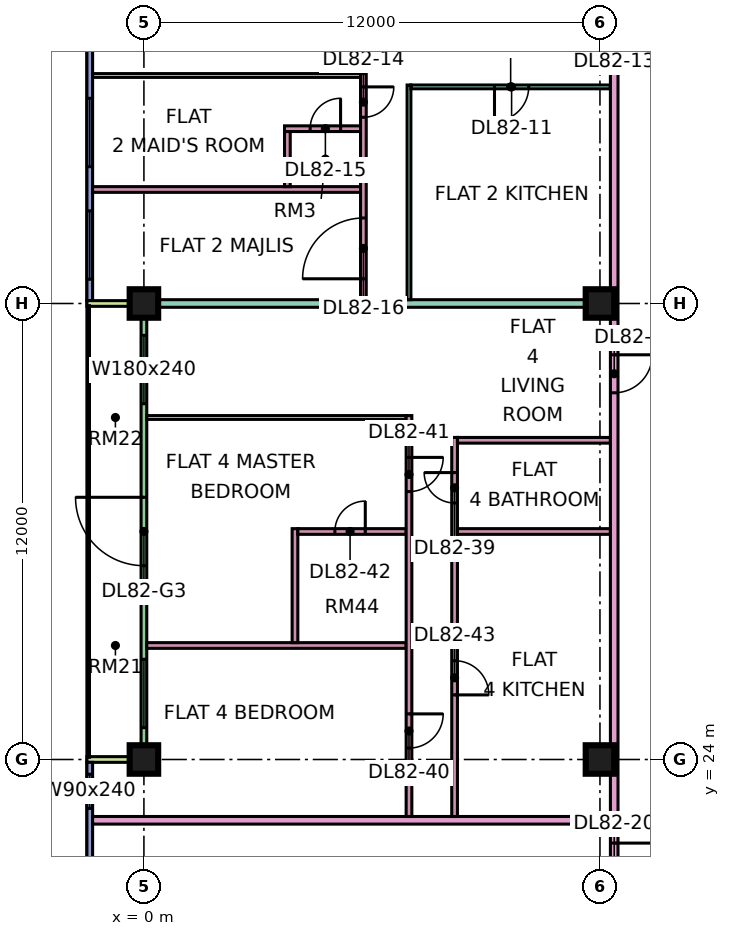
"""IFC4 building model, lengths in metres.
Left out: names, types, materials, properties, quantities, classifications, styles, units other than length and angle.
Written with IfcOpenShell. Run it as: python <this file> out.ifc"""

import sys

from ifc_helpers import new_model, si_unit, direction, frame, frame_2d, origin, origin_2d, place, context, subcontext, project, spatial, rectangle, extrude, element, fill, save


model = new_model("IFC4")
c1 = context("Model", 3, precision=1e-05, world=origin(), true_north=direction((0.0, 1.0)))
c2 = subcontext(c1, "Body", "Model", "MODEL_VIEW")
j1 = project(units=[si_unit("LENGTHUNIT", "METRE"), si_unit("PLANEANGLEUNIT", "RADIAN")], contexts=[c1])
p1 = place(None, origin())
s1 = spatial("IfcSite", under=j1, at=p1, CompositionType="ELEMENT")
p2 = place(p1, origin())
s2 = spatial("IfcBuilding", under=s1, at=p2, CompositionType="ELEMENT")
p3 = place(p2, frame((0.0, 0.0, 353.9)))
s3 = spatial("IfcBuildingStorey", under=s2, at=p3, CompositionType="ELEMENT", Elevation=353.9)
p4 = place(p3, frame((0.0, 24.0, 0.0), z_axis=(0.0, 0.0, 1.0), x_axis=(1.0, 0.0, 0.0)))
e1 = element("IfcColumn", 1, at=p4, inside=s3, PredefinedType="COLUMN", context=c2, shape_type="SweptSolid", body=[
    extrude(rectangle(XDim=0.75, YDim=0.75, at=origin_2d()), origin(), (0.0, 0.0, 1.0), 3.75),
])
p5 = place(p3, frame((0.0, 36.0, 0.0), z_axis=(0.0, 0.0, 1.0), x_axis=(1.0, 0.0, 0.0)))
e2 = element("IfcColumn", 2, at=p5, inside=s3, PredefinedType="COLUMN", context=c2, shape_type="SweptSolid", body=[
    extrude(rectangle(XDim=0.75, YDim=0.75, at=origin_2d()), origin(), (0.0, 0.0, 1.0), 3.75),
])
for number, where, z_axis, x_axis in (
    (3, (12.0, 24.0, 0.0), (0.0, 0.0, 1.0), (1.0, 0.0, 0.0)),
    (4, (12.0, 36.0, 0.0), (0.0, 0.0, 1.0), (1.0, 0.0, 0.0)),
):
    element("IfcColumn", number, at=place(p3, frame(where, z_axis=z_axis, x_axis=x_axis)), inside=s3, PredefinedType="COLUMN", context=c2, shape_type="SweptSolid", body=[
        extrude(rectangle(XDim=0.75, YDim=0.75, at=origin_2d()), origin(), (0.0, 0.0, 1.0), 3.75),
    ])
p6 = place(p3, frame((-1.425, 47.925, 0.0), z_axis=(0.0, 0.0, 1.0), x_axis=(0.0, -1.0, 0.0)))
e5 = element("IfcWall", 5, at=p6, inside=s3, PredefinedType="SOLIDWALL", context=c2, shape_type="SweptSolid", body=[
    extrude(rectangle(XDim=11.85, YDim=0.15, at=frame_2d((5.925, 0.0))), origin(), (0.0, 0.0, 1.0), 3.35),
])
p7 = place(p6, frame((1.462, 0.0, 0.45)))
e6 = element("IfcOpeningElement", 6, at=p7, cuts=e5, PredefinedType="OPENING", context=c2, shape_type="SweptSolid", body=[
    extrude(rectangle(XDim=3.0, YDim=2.4, at=frame_2d((1.5, 1.2))), frame((0.0, 0.085, 0.0), z_axis=(0.0, -1.0, 0.0), x_axis=(1.0, 0.0, 0.0)), (0.0, 0.0, 1.0), 0.17),
])
p8 = place(p6, frame((6.525, 0.0, 0.45)))
e7 = element("IfcOpeningElement", 7, at=p8, cuts=e5, PredefinedType="OPENING", context=c2, shape_type="SweptSolid", body=[
    extrude(rectangle(XDim=1.8, YDim=2.4, at=frame_2d((0.9, 1.2))), frame((0.0, 0.085, 0.0), z_axis=(0.0, -1.0, 0.0), x_axis=(1.0, 0.0, 0.0)), (0.0, 0.0, 1.0), 0.17),
])
p9 = place(p6, frame((9.488, 0.0, 0.45)))
e8 = element("IfcOpeningElement", 8, at=p9, cuts=e5, PredefinedType="OPENING", context=c2, shape_type="SweptSolid", body=[
    extrude(rectangle(XDim=1.8, YDim=2.4, at=frame_2d((0.9, 1.2))), frame((0.0, 0.085, 0.0), z_axis=(0.0, -1.0, 0.0), x_axis=(1.0, 0.0, 0.0)), (0.0, 0.0, 1.0), 0.17),
])
p10 = place(p3, frame((0.0, 35.925, 0.0), z_axis=(0.0, 0.0, 1.0), x_axis=(0.0, -1.0, 0.0)))
e9 = element("IfcWall", 9, at=p10, inside=s3, PredefinedType="SOLIDWALL", context=c2, shape_type="SweptSolid", body=[
    extrude(rectangle(XDim=11.85, YDim=0.15, at=frame_2d((5.925, 0.0))), origin(), (0.0, 0.0, 1.0), 3.35),
])
p11 = place(p10, frame((0.762, 0.0, 0.45)))
e10 = element("IfcOpeningElement", 10, at=p11, cuts=e9, PredefinedType="OPENING", context=c2, shape_type="SweptSolid", body=[
    extrude(rectangle(XDim=1.8, YDim=2.4, at=frame_2d((0.9, 1.2))), frame((0.0, 0.085, 0.0), z_axis=(0.0, -1.0, 0.0), x_axis=(1.0, 0.0, 0.0)), (0.0, 0.0, 1.0), 0.17),
])
p12 = place(p10, frame((5.025, 0.0, 0.0)))
e11 = element("IfcOpeningElement", 11, at=p12, cuts=e9, PredefinedType="OPENING", context=c2, shape_type="SweptSolid", body=[
    extrude(rectangle(XDim=1.8, YDim=2.4, at=frame_2d((0.9, 1.2))), frame((0.0, 0.085, 0.0), z_axis=(0.0, -1.0, 0.0), x_axis=(1.0, 0.0, 0.0)), (0.0, 0.0, 1.0), 0.17),
])
p13 = place(p10, frame((9.288, 0.0, 0.45)))
e12 = element("IfcOpeningElement", 12, at=p13, cuts=e9, PredefinedType="OPENING", context=c2, shape_type="SweptSolid", body=[
    extrude(rectangle(XDim=1.8, YDim=2.4, at=frame_2d((0.9, 1.2))), frame((0.0, 0.085, 0.0), z_axis=(0.0, -1.0, 0.0), x_axis=(1.0, 0.0, 0.0)), (0.0, 0.0, 1.0), 0.17),
])
for number, where, z_axis, x_axis in (
    (13, (-1.5, 36.0, 0.0), (0.0, 0.0, 1.0), (1.0, 0.0, 0.0)),
    (14, (-1.5, 24.0, 0.0), (0.0, 0.0, 1.0), (1.0, 0.0, 0.0)),
):
    element("IfcWall", number, at=place(p3, frame(where, z_axis=z_axis, x_axis=x_axis)), inside=s3, PredefinedType="SOLIDWALL", context=c2, shape_type="SweptSolid", body=[
        extrude(rectangle(XDim=1.5, YDim=0.15, at=frame_2d((0.75, 0.0))), origin(), (0.0, 0.0, 1.0), 3.35),
    ])
p14 = place(p3, frame((-1.425, 23.925, 0.0), z_axis=(0.0, 0.0, 1.0), x_axis=(0.0, -1.0, 0.0)))
e15 = element("IfcWall", 15, at=p14, inside=s3, PredefinedType="SOLIDWALL", context=c2, shape_type="SweptSolid", body=[
    extrude(rectangle(XDim=11.425, YDim=0.15, at=frame_2d((5.712, 0.0))), origin(), (0.0, 0.0, 1.0), 3.35),
])
p15 = place(p14, frame((0.312, 0.0, 0.45)))
e16 = element("IfcOpeningElement", 16, at=p15, cuts=e15, PredefinedType="OPENING", context=c2, shape_type="SweptSolid", body=[
    extrude(rectangle(XDim=0.9, YDim=2.4, at=frame_2d((0.45, 1.2))), frame((0.0, 0.085, 0.0), z_axis=(0.0, -1.0, 0.0), x_axis=(1.0, 0.0, 0.0)), (0.0, 0.0, 1.0), 0.17),
])
p16 = place(p14, frame((6.175, 0.0, 0.45)))
e17 = element("IfcOpeningElement", 17, at=p16, cuts=e15, PredefinedType="OPENING", context=c2, shape_type="SweptSolid", body=[
    extrude(rectangle(XDim=3.0, YDim=2.4, at=frame_2d((1.5, 1.2))), frame((0.0, 0.085, 0.0), z_axis=(0.0, -1.0, 0.0), x_axis=(1.0, 0.0, 0.0)), (0.0, 0.0, 1.0), 0.17),
])
p17 = place(p3, frame((-1.351, 39.0, 0.0), z_axis=(0.0, 0.0, 1.0), x_axis=(1.0, 0.0, 0.0)))
e18 = element("IfcWall", 18, at=p17, inside=s3, PredefinedType="PARTITIONING", context=c2, shape_type="SweptSolid", body=[
    extrude(rectangle(XDim=7.051, YDim=0.15, at=frame_2d((3.525, 0.0))), origin(), (0.0, 0.0, 1.0), 3.35),
])
p18 = place(p3, frame((-1.35, 22.4, 0.0), z_axis=(0.0, 0.0, 1.0), x_axis=(1.0, 0.0, 0.0)))
e19 = element("IfcWall", 19, at=p18, inside=s3, PredefinedType="PARTITIONING", context=c2, shape_type="SweptSolid", body=[
    extrude(rectangle(XDim=13.625, YDim=0.2, at=frame_2d((6.812, 0.0))), origin(), (0.0, 0.0, 1.0), 3.35),
])
e20 = element("IfcWall", 20, at=p5, inside=s3, PredefinedType="PARTITIONING", context=c2, shape_type="SweptSolid", body=[
    extrude(rectangle(XDim=12.275, YDim=0.2, at=frame_2d((6.137, 0.0))), origin(), (0.0, 0.0, 1.0), 3.35),
])
p19 = place(p3, frame((-1.35, 42.0, 0.0), z_axis=(0.0, 0.0, 1.0), x_axis=(1.0, 0.0, 0.0)))
e21 = element("IfcWall", 21, at=p19, inside=s3, PredefinedType="PARTITIONING", context=c2, shape_type="SweptSolid", body=[
    extrude(rectangle(XDim=7.05, YDim=0.1, at=frame_2d((3.525, 0.0))), origin(), (0.0, 0.0, 1.0), 3.35),
])
p20 = place(p3, frame((0.074, 27.0, 0.0), z_axis=(0.0, 0.0, 1.0), x_axis=(1.0, 0.0, 0.0)))
e22 = element("IfcWall", 22, at=p20, inside=s3, PredefinedType="PARTITIONING", context=c2, shape_type="SweptSolid", body=[
    extrude(rectangle(XDim=6.826, YDim=0.15, at=frame_2d((3.413, 0.0))), origin(), (0.0, 0.0, 1.0), 3.35),
])
p21 = place(p3, frame((0.074, 33.0, 0.0), z_axis=(0.0, 0.0, 1.0), x_axis=(1.0, 0.0, 0.0)))
e23 = element("IfcWall", 23, at=p21, inside=s3, PredefinedType="PARTITIONING", context=c2, shape_type="SweptSolid", body=[
    extrude(rectangle(XDim=6.826, YDim=0.1, at=frame_2d((3.413, 0.0))), origin(), (0.0, 0.0, 1.0), 3.35),
])
p22 = place(p3, frame((3.7, 40.6, 0.0), z_axis=(0.0, 0.0, 1.0), x_axis=(1.0, 0.0, 0.0)))
e24 = element("IfcWall", 24, at=p22, inside=s3, PredefinedType="PARTITIONING", context=c2, shape_type="SweptSolid", body=[
    extrude(rectangle(XDim=2.0, YDim=0.15, at=frame_2d((1.0, 0.0))), origin(), (0.0, 0.0, 1.0), 3.35),
])
p23 = place(p22, frame((0.675, 0.0, 0.0)))
e25 = element("IfcOpeningElement", 25, at=p23, cuts=e24, PredefinedType="OPENING", context=c2, shape_type="SweptSolid", body=[
    extrude(rectangle(XDim=0.8, YDim=2.1, at=frame_2d((0.4, 1.05))), frame((0.0, 0.085, 0.0), z_axis=(0.0, -1.0, 0.0), x_axis=(1.0, 0.0, 0.0)), (0.0, 0.0, 1.0), 0.17),
])
p24 = place(p3, frame((3.775, 39.075, 0.0), z_axis=(0.0, 0.0, 1.0), x_axis=(0.0, 1.0, 0.0)))
e26 = element("IfcWall", 26, at=p24, inside=s3, PredefinedType="PARTITIONING", context=c2, shape_type="SweptSolid", body=[
    extrude(rectangle(XDim=1.45, YDim=0.15, at=frame_2d((0.725, 0.0))), origin(), (0.0, 0.0, 1.0), 3.35),
])
p25 = place(p3, frame((3.975, 27.075, 0.0), z_axis=(0.0, 0.0, 1.0), x_axis=(0.0, 1.0, 0.0)))
e27 = element("IfcWall", 27, at=p25, inside=s3, PredefinedType="PARTITIONING", context=c2, shape_type="SweptSolid", body=[
    extrude(rectangle(XDim=3.0, YDim=0.15, at=frame_2d((1.5, 0.0))), origin(), (0.0, 0.0, 1.0), 3.35),
])
p26 = place(p3, frame((4.05, 30.0, 0.0), z_axis=(0.0, 0.0, 1.0), x_axis=(1.0, 0.0, 0.0)))
e28 = element("IfcWall", 28, at=p26, inside=s3, PredefinedType="PARTITIONING", context=c2, shape_type="SweptSolid", body=[
    extrude(rectangle(XDim=2.85, YDim=0.15, at=frame_2d((1.425, 0.0))), origin(), (0.0, 0.0, 1.0), 3.35),
])
p27 = place(p26, frame((0.975, 0.0, 0.0)))
e29 = element("IfcOpeningElement", 29, at=p27, cuts=e28, PredefinedType="OPENING", context=c2, shape_type="SweptSolid", body=[
    extrude(rectangle(XDim=0.8, YDim=2.1, at=frame_2d((0.4, 1.05))), frame((0.0, 0.085, 0.0), z_axis=(0.0, -1.0, 0.0), x_axis=(1.0, 0.0, 0.0)), (0.0, 0.0, 1.0), 0.17),
])
p28 = place(p3, frame((5.775, 36.1, 0.0), z_axis=(0.0, 0.0, 1.0), x_axis=(0.0, 1.0, 0.0)))
e30 = element("IfcWall", 30, at=p28, inside=s3, PredefinedType="PARTITIONING", context=c2, shape_type="SweptSolid", body=[
    extrude(rectangle(XDim=5.95, YDim=0.15, at=frame_2d((2.975, 0.0))), origin(), (0.0, 0.0, 1.0), 3.35),
])
p29 = place(p28, frame((4.8, 0.0, 0.0)))
e31 = element("IfcOpeningElement", 31, at=p29, cuts=e30, PredefinedType="OPENING", context=c2, shape_type="SweptSolid", body=[
    extrude(rectangle(XDim=0.8, YDim=2.1, at=frame_2d((0.4, 1.05))), frame((0.0, 0.085, 0.0), z_axis=(0.0, -1.0, 0.0), x_axis=(1.0, 0.0, 0.0)), (0.0, 0.0, 1.0), 0.17),
])
p30 = place(p28, frame((0.55, 0.0, 0.0)))
e32 = element("IfcOpeningElement", 32, at=p30, cuts=e30, PredefinedType="OPENING", context=c2, shape_type="SweptSolid", body=[
    extrude(rectangle(XDim=1.6, YDim=2.1, at=frame_2d((0.8, 1.05))), frame((0.0, 0.085, 0.0), z_axis=(0.0, -1.0, 0.0), x_axis=(1.0, 0.0, 0.0)), (0.0, 0.0, 1.0), 0.17),
])
p31 = place(p3, frame((6.975, 22.5, 0.0), z_axis=(0.0, 0.0, 1.0), x_axis=(0.0, 1.0, 0.0)))
e33 = element("IfcWall", 33, at=p31, inside=s3, PredefinedType="PARTITIONING", context=c2, shape_type="SweptSolid", body=[
    extrude(rectangle(XDim=10.55, YDim=0.15, at=frame_2d((5.275, 0.0))), origin(), (0.0, 0.0, 1.0), 3.35),
])
p32 = place(p31, frame((1.8, 0.0, 0.0)))
e34 = element("IfcOpeningElement", 34, at=p32, cuts=e33, PredefinedType="OPENING", context=c2, shape_type="SweptSolid", body=[
    extrude(rectangle(XDim=0.9, YDim=2.1, at=frame_2d((0.45, 1.05))), frame((0.0, 0.085, 0.0), z_axis=(0.0, -1.0, 0.0), x_axis=(1.0, 0.0, 0.0)), (0.0, 0.0, 1.0), 0.17),
])
p33 = place(p31, frame((8.55, 0.0, 0.0)))
e35 = element("IfcOpeningElement", 35, at=p33, cuts=e33, PredefinedType="OPENING", context=c2, shape_type="SweptSolid", body=[
    extrude(rectangle(XDim=0.9, YDim=2.1, at=frame_2d((0.45, 1.05))), frame((0.0, 0.085, 0.0), z_axis=(0.0, -1.0, 0.0), x_axis=(1.0, 0.0, 0.0)), (0.0, 0.0, 1.0), 0.17),
])
p34 = place(p3, frame((6.975, 36.1, 0.0), z_axis=(0.0, 0.0, 1.0), x_axis=(0.0, 1.0, 0.0)))
e36 = element("IfcWall", 36, at=p34, inside=s3, PredefinedType="PARTITIONING", context=c2, shape_type="SweptSolid", body=[
    extrude(rectangle(XDim=5.65, YDim=0.1, at=frame_2d((2.825, 0.0))), origin(), (0.0, 0.0, 1.0), 3.35),
])
p35 = place(p3, frame((7.025, 41.7, 0.0), z_axis=(0.0, 0.0, 1.0), x_axis=(1.0, 0.0, 0.0)))
e37 = element("IfcWall", 37, at=p35, inside=s3, PredefinedType="PARTITIONING", context=c2, shape_type="SweptSolid", body=[
    extrude(rectangle(XDim=5.25, YDim=0.1, at=frame_2d((2.625, 0.0))), origin(), (0.0, 0.0, 1.0), 3.35),
])
p36 = place(p35, frame((2.2, 0.0, 0.0)))
e38 = element("IfcOpeningElement", 38, at=p36, cuts=e37, PredefinedType="OPENING", context=c2, shape_type="SweptSolid", body=[
    extrude(rectangle(XDim=0.9, YDim=2.1, at=frame_2d((0.45, 1.05))), frame((0.0, 0.06, 0.0), z_axis=(0.0, -1.0, 0.0), x_axis=(1.0, 0.0, 0.0)), (0.0, 0.0, 1.0), 0.12),
])
p37 = place(p3, frame((8.175, 22.5, 0.0), z_axis=(0.0, 0.0, 1.0), x_axis=(0.0, 1.0, 0.0)))
e39 = element("IfcWall", 39, at=p37, inside=s3, PredefinedType="PARTITIONING", context=c2, shape_type="SweptSolid", body=[
    extrude(rectangle(XDim=9.975, YDim=0.15, at=frame_2d((4.988, 0.0))), origin(), (0.0, 0.0, 1.0), 3.35),
])
p38 = place(p37, frame((8.25, 0.0, 0.0)))
e40 = element("IfcOpeningElement", 40, at=p38, cuts=e39, PredefinedType="OPENING", context=c2, shape_type="SweptSolid", body=[
    extrude(rectangle(XDim=0.8, YDim=2.1, at=frame_2d((0.4, 1.05))), frame((0.0, 0.085, 0.0), z_axis=(0.0, -1.0, 0.0), x_axis=(1.0, 0.0, 0.0)), (0.0, 0.0, 1.0), 0.17),
])
p39 = place(p37, frame((3.2, 0.0, 0.0)))
e41 = element("IfcOpeningElement", 41, at=p39, cuts=e39, PredefinedType="OPENING", context=c2, shape_type="SweptSolid", body=[
    extrude(rectangle(XDim=0.9, YDim=2.1, at=frame_2d((0.45, 1.05))), frame((0.0, 0.085, 0.0), z_axis=(0.0, -1.0, 0.0), x_axis=(1.0, 0.0, 0.0)), (0.0, 0.0, 1.0), 0.17),
])
for number, where, z_axis, x_axis in (
    (42, (8.25, 30.0, 0.0), (0.0, 0.0, 1.0), (1.0, 0.0, 0.0)),
    (43, (8.25, 32.4, 0.0), (0.0, 0.0, 1.0), (1.0, 0.0, 0.0)),
):
    element("IfcWall", number, at=place(p3, frame(where, z_axis=z_axis, x_axis=x_axis)), inside=s3, PredefinedType="PARTITIONING", context=c2, shape_type="SweptSolid", body=[
        extrude(rectangle(XDim=4.025, YDim=0.15, at=frame_2d((2.012, 0.0))), origin(), (0.0, 0.0, 1.0), 3.35),
    ])
p40 = place(p3, frame((12.375, 20.0, 0.0), z_axis=(0.0, 0.0, 1.0), x_axis=(0.0, 1.0, 0.0)))
e44 = element("IfcWall", 44, at=p40, inside=s3, PredefinedType="PARTITIONING", context=c2, shape_type="SweptSolid", body=[
    extrude(rectangle(XDim=34.0, YDim=0.2, at=frame_2d((17.0, 0.0))), origin(), (0.0, 0.0, 1.0), 3.35),
])
p41 = place(p40, frame((22.95, 0.0, 0.0)))
e45 = element("IfcOpeningElement", 45, at=p41, cuts=e44, PredefinedType="OPENING", context=c2, shape_type="SweptSolid", body=[
    extrude(rectangle(XDim=1.0, YDim=2.1, at=frame_2d((0.5, 1.05))), frame((0.0, 0.11, 0.0), z_axis=(0.0, -1.0, 0.0), x_axis=(1.0, 0.0, 0.0)), (0.0, 0.0, 1.0), 0.22),
])
p42 = place(p40, frame((0.6, 0.0, 0.0)))
e46 = element("IfcOpeningElement", 46, at=p42, cuts=e44, PredefinedType="OPENING", context=c2, shape_type="SweptSolid", body=[
    extrude(rectangle(XDim=1.2, YDim=2.1, at=frame_2d((0.6, 1.05))), frame((0.0, 0.11, 0.0), z_axis=(0.0, -1.0, 0.0), x_axis=(1.0, 0.0, 0.0)), (0.0, 0.0, 1.0), 0.22),
])
p43 = place(p40, frame((13.65, 0.0, 0.0)))
e47 = element("IfcOpeningElement", 47, at=p43, cuts=e44, PredefinedType="OPENING", context=c2, shape_type="SweptSolid", body=[
    extrude(rectangle(XDim=1.0, YDim=2.1, at=frame_2d((0.5, 1.05))), frame((0.0, 0.11, 0.0), z_axis=(0.0, -1.0, 0.0), x_axis=(1.0, 0.0, 0.0)), (0.0, 0.0, 1.0), 0.22),
])
p44 = place(p8, origin())
e48 = element("IfcWindow", 48, at=p44, inside=s3, PartitioningType="SINGLE_PANEL", PredefinedType="WINDOW", context=c2, shape_type="SweptSolid", body=[
    extrude(rectangle(XDim=1.8, YDim=2.4, at=frame_2d((0.9, 1.2))), frame((0.0, 0.03, 0.0), z_axis=(0.0, -1.0, 0.0), x_axis=(1.0, 0.0, 0.0)), (0.0, 0.0, 1.0), 0.06),
])
fill(e7, e48)
p45 = place(p9, origin())
e49 = element("IfcWindow", 49, at=p45, inside=s3, PartitioningType="SINGLE_PANEL", PredefinedType="WINDOW", context=c2, shape_type="SweptSolid", body=[
    extrude(rectangle(XDim=1.8, YDim=2.4, at=frame_2d((0.9, 1.2))), frame((0.0, 0.03, 0.0), z_axis=(0.0, -1.0, 0.0), x_axis=(1.0, 0.0, 0.0)), (0.0, 0.0, 1.0), 0.06),
])
fill(e8, e49)
p46 = place(p11, origin())
e50 = element("IfcWindow", 50, at=p46, inside=s3, PartitioningType="SINGLE_PANEL", PredefinedType="WINDOW", context=c2, shape_type="SweptSolid", body=[
    extrude(rectangle(XDim=1.8, YDim=2.4, at=frame_2d((0.9, 1.2))), frame((0.0, 0.03, 0.0), z_axis=(0.0, -1.0, 0.0), x_axis=(1.0, 0.0, 0.0)), (0.0, 0.0, 1.0), 0.06),
])
fill(e10, e50)
p47 = place(p12, frame((1.8, 0.0, 0.0), z_axis=(0.0, 0.0, 1.0), x_axis=(-1.0, 0.0, 0.0)))
e51 = element("IfcDoor", 51, at=p47, inside=s3, OperationType="DOUBLE_DOOR_SINGLE_SWING", PredefinedType="DOOR", context=c2, shape_type="SweptSolid", body=[
    extrude(rectangle(XDim=1.8, YDim=2.4, at=frame_2d((0.9, 1.2))), frame((0.0, 0.025, 0.0), z_axis=(0.0, -1.0, 0.0), x_axis=(1.0, 0.0, 0.0)), (0.0, 0.0, 1.0), 0.05),
])
fill(e11, e51)
p48 = place(p13, origin())
e52 = element("IfcWindow", 52, at=p48, inside=s3, PartitioningType="SINGLE_PANEL", PredefinedType="WINDOW", context=c2, shape_type="SweptSolid", body=[
    extrude(rectangle(XDim=1.8, YDim=2.4, at=frame_2d((0.9, 1.2))), frame((0.0, 0.03, 0.0), z_axis=(0.0, -1.0, 0.0), x_axis=(1.0, 0.0, 0.0)), (0.0, 0.0, 1.0), 0.06),
])
fill(e12, e52)
p49 = place(p15, origin())
e53 = element("IfcWindow", 53, at=p49, inside=s3, PartitioningType="SINGLE_PANEL", PredefinedType="WINDOW", context=c2, shape_type="SweptSolid", body=[
    extrude(rectangle(XDim=0.9, YDim=2.4, at=frame_2d((0.45, 1.2))), frame((0.0, 0.03, 0.0), z_axis=(0.0, -1.0, 0.0), x_axis=(1.0, 0.0, 0.0)), (0.0, 0.0, 1.0), 0.06),
])
fill(e16, e53)
p50 = place(p36, frame((0.9, 0.0, 0.0), z_axis=(0.0, 0.0, 1.0), x_axis=(-1.0, 0.0, 0.0)))
e54 = element("IfcDoor", 54, at=p50, inside=s3, OperationType="SINGLE_SWING_LEFT", PredefinedType="DOOR", context=c2, shape_type="SweptSolid", body=[
    extrude(rectangle(XDim=0.9, YDim=2.1, at=frame_2d((0.45, 1.05))), frame((0.0, 0.025, 0.0), z_axis=(0.0, -1.0, 0.0), x_axis=(1.0, 0.0, 0.0)), (0.0, 0.0, 1.0), 0.05),
])
fill(e38, e54)
p51 = place(p29, origin())
e55 = element("IfcDoor", 55, at=p51, inside=s3, OperationType="SINGLE_SWING_RIGHT", PredefinedType="DOOR", context=c2, shape_type="SweptSolid", body=[
    extrude(rectangle(XDim=0.8, YDim=2.1, at=frame_2d((0.4, 1.05))), frame((0.0, 0.025, 0.0), z_axis=(0.0, -1.0, 0.0), x_axis=(1.0, 0.0, 0.0)), (0.0, 0.0, 1.0), 0.05),
])
fill(e31, e55)
p52 = place(p23, frame((0.8, 0.0, 0.0), z_axis=(0.0, 0.0, 1.0), x_axis=(-1.0, 0.0, 0.0)))
e56 = element("IfcDoor", 56, at=p52, inside=s3, OperationType="SINGLE_SWING_RIGHT", PredefinedType="DOOR", context=c2, shape_type="SweptSolid", body=[
    extrude(rectangle(XDim=0.8, YDim=2.1, at=frame_2d((0.4, 1.05))), frame((0.0, 0.025, 0.0), z_axis=(0.0, -1.0, 0.0), x_axis=(1.0, 0.0, 0.0)), (0.0, 0.0, 1.0), 0.05),
])
fill(e25, e56)
p53 = place(p30, origin())
e57 = element("IfcDoor", 57, at=p53, inside=s3, OperationType="DOUBLE_DOOR_SINGLE_SWING", PredefinedType="DOOR", context=c2, shape_type="SweptSolid", body=[
    extrude(rectangle(XDim=1.6, YDim=2.1, at=frame_2d((0.8, 1.05))), frame((0.0, 0.025, 0.0), z_axis=(0.0, -1.0, 0.0), x_axis=(1.0, 0.0, 0.0)), (0.0, 0.0, 1.0), 0.05),
])
fill(e32, e57)
p54 = place(p42, origin())
e58 = element("IfcDoor", 58, at=p54, inside=s3, OperationType="SINGLE_SWING_RIGHT", PredefinedType="DOOR", context=c2, shape_type="SweptSolid", body=[
    extrude(rectangle(XDim=1.2, YDim=2.1, at=frame_2d((0.6, 1.05))), frame((0.0, 0.025, 0.0), z_axis=(0.0, -1.0, 0.0), x_axis=(1.0, 0.0, 0.0)), (0.0, 0.0, 1.0), 0.05),
])
fill(e46, e58)
p55 = place(p38, frame((0.8, 0.0, 0.0), z_axis=(0.0, 0.0, 1.0), x_axis=(-1.0, 0.0, 0.0)))
e59 = element("IfcDoor", 59, at=p55, inside=s3, OperationType="SINGLE_SWING_RIGHT", PredefinedType="DOOR", context=c2, shape_type="SweptSolid", body=[
    extrude(rectangle(XDim=0.8, YDim=2.1, at=frame_2d((0.4, 1.05))), frame((0.0, 0.025, 0.0), z_axis=(0.0, -1.0, 0.0), x_axis=(1.0, 0.0, 0.0)), (0.0, 0.0, 1.0), 0.05),
])
fill(e40, e59)
p56 = place(p32, origin())
e60 = element("IfcDoor", 60, at=p56, inside=s3, OperationType="SINGLE_SWING_RIGHT", PredefinedType="DOOR", context=c2, shape_type="SweptSolid", body=[
    extrude(rectangle(XDim=0.9, YDim=2.1, at=frame_2d((0.45, 1.05))), frame((0.0, 0.025, 0.0), z_axis=(0.0, -1.0, 0.0), x_axis=(1.0, 0.0, 0.0)), (0.0, 0.0, 1.0), 0.05),
])
fill(e34, e60)
p57 = place(p33, origin())
e61 = element("IfcDoor", 61, at=p57, inside=s3, OperationType="SINGLE_SWING_RIGHT", PredefinedType="DOOR", context=c2, shape_type="SweptSolid", body=[
    extrude(rectangle(XDim=0.9, YDim=2.1, at=frame_2d((0.45, 1.05))), frame((0.0, 0.025, 0.0), z_axis=(0.0, -1.0, 0.0), x_axis=(1.0, 0.0, 0.0)), (0.0, 0.0, 1.0), 0.05),
])
fill(e35, e61)
p58 = place(p27, frame((0.8, 0.0, 0.0), z_axis=(0.0, 0.0, 1.0), x_axis=(-1.0, 0.0, 0.0)))
e62 = element("IfcDoor", 62, at=p58, inside=s3, OperationType="SINGLE_SWING_RIGHT", PredefinedType="DOOR", context=c2, shape_type="SweptSolid", body=[
    extrude(rectangle(XDim=0.8, YDim=2.1, at=frame_2d((0.4, 1.05))), frame((0.0, 0.025, 0.0), z_axis=(0.0, -1.0, 0.0), x_axis=(1.0, 0.0, 0.0)), (0.0, 0.0, 1.0), 0.05),
])
fill(e29, e62)
p59 = place(p39, frame((0.9, 0.0, 0.0), z_axis=(0.0, 0.0, 1.0), x_axis=(-1.0, 0.0, 0.0)))
e63 = element("IfcDoor", 63, at=p59, inside=s3, OperationType="SINGLE_SWING_LEFT", PredefinedType="DOOR", context=c2, shape_type="SweptSolid", body=[
    extrude(rectangle(XDim=0.9, YDim=2.1, at=frame_2d((0.45, 1.05))), frame((0.0, 0.025, 0.0), z_axis=(0.0, -1.0, 0.0), x_axis=(1.0, 0.0, 0.0)), (0.0, 0.0, 1.0), 0.05),
])
fill(e41, e63)
p60 = place(p43, origin())
e64 = element("IfcDoor", 64, at=p60, inside=s3, OperationType="SINGLE_SWING_RIGHT", PredefinedType="DOOR", context=c2, shape_type="SweptSolid", body=[
    extrude(rectangle(XDim=1.0, YDim=2.1, at=frame_2d((0.5, 1.05))), frame((0.0, 0.025, 0.0), z_axis=(0.0, -1.0, 0.0), x_axis=(1.0, 0.0, 0.0)), (0.0, 0.0, 1.0), 0.05),
])
fill(e47, e64)
save(model, sys.argv[1])
